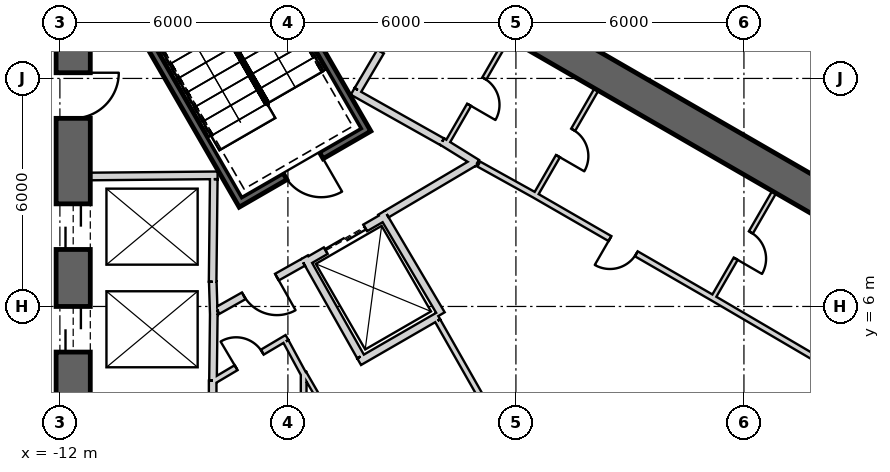
"""IFC4 building model, lengths in metres.
Left out: names, types, materials, properties, quantities, classifications, styles, units other than length and angle.
Written with IfcOpenShell. Run it as: python <this file> out.ifc"""

import sys

from ifc_helpers import new_model, si_unit, direction, frame, frame_2d, origin, place, context, subcontext, project, spatial, rectangle, extrude, element, fill, save


model = new_model("IFC4")
c1 = context("Model", 3, precision=1e-05, world=origin(), true_north=direction((0.0, 1.0)))
c2 = subcontext(c1, "Body", "Model", "MODEL_VIEW")
j1 = project(units=[si_unit("LENGTHUNIT", "METRE"), si_unit("PLANEANGLEUNIT", "RADIAN")], contexts=[c1])
p1 = place(None, origin())
s1 = spatial("IfcSite", under=j1, at=p1, CompositionType="ELEMENT")
p2 = place(p1, origin())
s2 = spatial("IfcBuilding", under=s1, at=p2, CompositionType="ELEMENT")
p3 = place(p2, frame((0.0, 0.0, 392.3)))
s3 = spatial("IfcBuildingStorey", under=s2, at=p3, CompositionType="ELEMENT", Elevation=392.3)
p4 = place(p3, frame((19.475, 2.208, 0.0), z_axis=(0.0, 0.0, 1.0), x_axis=(-0.866028369851, 0.499994862586, 0.0)))
e1 = element("IfcWall", 1, at=p4, inside=s3, PredefinedType="SHEAR", context=c2, shape_type="SweptSolid", body=[
    extrude(rectangle(XDim=31.523, YDim=0.9, at=frame_2d((15.762, 0.0))), origin(), (0.0, 0.0, 1.0), 6.0),
])
p5 = place(p4, frame((7.062, 0.0, 0.0)))
e2 = element("IfcOpeningElement", 2, at=p5, cuts=e1, PredefinedType="OPENING", context=c2, shape_type="SweptSolid", body=[
    extrude(rectangle(XDim=1.2, YDim=2.4, at=frame_2d((0.6, 1.2))), frame((0.0, 0.46, 0.0), z_axis=(0.0, -1.0, 0.0), x_axis=(1.0, 0.0, 0.0)), (0.0, 0.0, 1.0), 0.92),
])
p6 = place(p4, frame((3.612, 0.0, 0.0)))
e3 = element("IfcOpeningElement", 3, at=p6, cuts=e1, PredefinedType="OPENING", context=c2, shape_type="SweptSolid", body=[
    extrude(rectangle(XDim=1.2, YDim=2.4, at=frame_2d((0.6, 1.2))), frame((0.0, 0.46, 0.0), z_axis=(0.0, -1.0, 0.0), x_axis=(1.0, 0.0, 0.0)), (0.0, 0.0, 1.0), 0.92),
])
p7 = place(p4, frame((26.712, 0.0, 0.0)))
e4 = element("IfcOpeningElement", 4, at=p7, cuts=e1, PredefinedType="OPENING", context=c2, shape_type="SweptSolid", body=[
    extrude(rectangle(XDim=1.2, YDim=2.4, at=frame_2d((0.6, 1.2))), frame((0.0, 0.46, 0.0), z_axis=(0.0, -1.0, 0.0), x_axis=(1.0, 0.0, 0.0)), (0.0, 0.0, 1.0), 0.92),
])
p8 = place(p3, frame((-11.65, 15.762, 0.0), z_axis=(0.0, 0.0, 1.0), x_axis=(0.0, -1.0, 0.0)))
e5 = element("IfcWall", 5, at=p8, inside=s3, PredefinedType="SHEAR", context=c2, shape_type="SweptSolid", body=[
    extrude(rectangle(XDim=31.523, YDim=0.9, at=frame_2d((15.762, 0.0))), origin(), (0.0, 0.0, 1.0), 6.0),
])
p9 = place(p8, frame((7.062, 0.0, 0.0)))
e6 = element("IfcOpeningElement", 6, at=p9, cuts=e5, PredefinedType="OPENING", context=c2, shape_type="SweptSolid", body=[
    extrude(rectangle(XDim=1.2, YDim=2.4, at=frame_2d((0.6, 1.2))), frame((0.0, 0.46, 0.0), z_axis=(0.0, -1.0, 0.0), x_axis=(1.0, 0.0, 0.0)), (0.0, 0.0, 1.0), 0.92),
])
p10 = place(p8, frame((9.762, 0.0, 0.0)))
e7 = element("IfcOpeningElement", 7, at=p10, cuts=e5, PredefinedType="OPENING", context=c2, shape_type="SweptSolid", body=[
    extrude(rectangle(XDim=1.2, YDim=2.4, at=frame_2d((0.6, 1.2))), frame((0.0, 0.46, 0.0), z_axis=(0.0, -1.0, 0.0), x_axis=(1.0, 0.0, 0.0)), (0.0, 0.0, 1.0), 0.92),
])
p11 = place(p8, frame((12.462, 0.0, 0.0)))
e8 = element("IfcOpeningElement", 8, at=p11, cuts=e5, PredefinedType="OPENING", context=c2, shape_type="SweptSolid", body=[
    extrude(rectangle(XDim=1.2, YDim=2.4, at=frame_2d((0.6, 1.2))), frame((0.0, 0.46, 0.0), z_axis=(0.0, -1.0, 0.0), x_axis=(1.0, 0.0, 0.0)), (0.0, 0.0, 1.0), 0.92),
])
p12 = place(p8, frame((15.162, 0.0, 0.0)))
e9 = element("IfcOpeningElement", 9, at=p12, cuts=e5, PredefinedType="OPENING", context=c2, shape_type="SweptSolid", body=[
    extrude(rectangle(XDim=1.2, YDim=2.4, at=frame_2d((0.6, 1.2))), frame((0.0, 0.46, 0.0), z_axis=(0.0, -1.0, 0.0), x_axis=(1.0, 0.0, 0.0)), (0.0, 0.0, 1.0), 0.92),
])
p13 = place(p8, frame((17.862, 0.0, 0.0)))
e10 = element("IfcOpeningElement", 10, at=p13, cuts=e5, PredefinedType="OPENING", context=c2, shape_type="SweptSolid", body=[
    extrude(rectangle(XDim=1.2, YDim=2.4, at=frame_2d((0.6, 1.2))), frame((0.0, 0.46, 0.0), z_axis=(0.0, -1.0, 0.0), x_axis=(1.0, 0.0, 0.0)), (0.0, 0.0, 1.0), 0.92),
])
p14 = place(p8, frame((20.562, 0.0, 0.0)))
e11 = element("IfcOpeningElement", 11, at=p14, cuts=e5, PredefinedType="OPENING", context=c2, shape_type="SweptSolid", body=[
    extrude(rectangle(XDim=1.2, YDim=2.4, at=frame_2d((0.6, 1.2))), frame((0.0, 0.46, 0.0), z_axis=(0.0, -1.0, 0.0), x_axis=(1.0, 0.0, 0.0)), (0.0, 0.0, 1.0), 0.92),
])
p15 = place(p8, frame((23.262, 0.0, 0.0)))
e12 = element("IfcOpeningElement", 12, at=p15, cuts=e5, PredefinedType="OPENING", context=c2, shape_type="SweptSolid", body=[
    extrude(rectangle(XDim=1.2, YDim=2.4, at=frame_2d((0.6, 1.2))), frame((0.0, 0.46, 0.0), z_axis=(0.0, -1.0, 0.0), x_axis=(1.0, 0.0, 0.0)), (0.0, 0.0, 1.0), 0.92),
])
p16 = place(p8, frame((3.612, 0.0, 0.0)))
e13 = element("IfcOpeningElement", 13, at=p16, cuts=e5, PredefinedType="OPENING", context=c2, shape_type="SweptSolid", body=[
    extrude(rectangle(XDim=1.2, YDim=2.4, at=frame_2d((0.6, 1.2))), frame((0.0, 0.46, 0.0), z_axis=(0.0, -1.0, 0.0), x_axis=(1.0, 0.0, 0.0)), (0.0, 0.0, 1.0), 0.92),
])
p17 = place(p8, frame((26.712, 0.0, 0.0)))
e14 = element("IfcOpeningElement", 14, at=p17, cuts=e5, PredefinedType="OPENING", context=c2, shape_type="SweptSolid", body=[
    extrude(rectangle(XDim=1.2, YDim=2.4, at=frame_2d((0.6, 1.2))), frame((0.0, 0.46, 0.0), z_axis=(0.0, -1.0, 0.0), x_axis=(1.0, 0.0, 0.0)), (0.0, 0.0, 1.0), 0.92),
])
p18 = place(p3, frame((-11.2, 9.42, 0.0), z_axis=(0.0, 0.0, 1.0), x_axis=(0.999957167047, 0.009255488683, 0.0)))
e15 = element("IfcWall", 15, at=p18, inside=s3, PredefinedType="PLUMBINGWALL", context=c2, shape_type="SweptSolid", body=[
    extrude(rectangle(XDim=3.35, YDim=0.2, at=frame_2d((1.675, 0.0))), origin(), (0.0, 0.0, 1.0), 5.7),
])
p19 = place(p3, frame((-7.951, 9.35, 0.0), z_axis=(0.0, 0.0, 1.0), x_axis=(-0.011120469654, -0.999938165666, 0.0)))
e16 = element("IfcWall", 16, at=p19, inside=s3, PredefinedType="PLUMBINGWALL", context=c2, shape_type="SweptSolid", body=[
    extrude(rectangle(XDim=2.7, YDim=0.2, at=frame_2d((1.35, 0.0))), origin(), (0.0, 0.0, 1.0), 5.7),
])
p20 = place(p3, frame((-7.977, 6.65, 0.0), z_axis=(0.0, 0.0, 1.0), x_axis=(0.030861509705, -0.999523670164, 0.0)))
e17 = element("IfcWall", 17, at=p20, inside=s3, PredefinedType="PLUMBINGWALL", context=c2, shape_type="SweptSolid", body=[
    extrude(rectangle(XDim=0.878, YDim=0.2, at=frame_2d((0.439, 0.0))), origin(), (0.0, 0.0, 1.0), 5.7),
])
p21 = place(p3, frame((-7.949, 5.895, 0.0), z_axis=(0.0, 0.0, 1.0), x_axis=(-0.012042535896, -0.999927486035, 0.0)))
e18 = element("IfcWall", 18, at=p21, inside=s3, PredefinedType="PLUMBINGWALL", context=c2, shape_type="SweptSolid", body=[
    extrude(rectangle(XDim=1.845, YDim=0.2, at=frame_2d((0.922, 0.0))), origin(), (0.0, 0.0, 1.0), 5.7),
])
p22 = place(p3, frame((-7.98, 4.05, 0.0), z_axis=(0.0, 0.0, 1.0), x_axis=(0.0, -1.0, 0.0)))
e19 = element("IfcWall", 19, at=p22, inside=s3, PredefinedType="PLUMBINGWALL", context=c2, shape_type="SweptSolid", body=[
    extrude(rectangle(XDim=8.1, YDim=0.2, at=frame_2d((4.05, 0.0))), origin(), (0.0, 0.0, 1.0), 5.7),
])
p23 = place(p3, frame((-11.245, 15.678, -0.35), z_axis=(0.0, 0.0, 1.0), x_axis=(0.499977274689, -0.866038523851, 0.0)))
e20 = element("IfcWall", 20, at=p23, inside=s3, PredefinedType="SHEAR", context=c2, shape_type="SweptSolid", body=[
    extrude(rectangle(XDim=8.1, YDim=0.2, at=frame_2d((4.05, 0.0))), origin(), (0.0, 0.0, 1.0), 6.05),
])
p24 = place(p3, frame((-7.854, 17.405, -0.35), z_axis=(0.0, 0.0, 1.0), x_axis=(0.499997992926, -0.866026562566, 0.0)))
e21 = element("IfcWall", 21, at=p24, inside=s3, PredefinedType="SHEAR", context=c2, shape_type="SweptSolid", body=[
    extrude(rectangle(XDim=7.9, YDim=0.2, at=frame_2d((3.95, 0.0))), origin(), (0.0, 0.0, 1.0), 6.05),
])
p25 = place(p3, frame((-7.159, 8.8, -0.35), z_axis=(0.0, 0.0, 1.0), x_axis=(0.866047807691, 0.499961193289, 0.0)))
e22 = element("IfcWall", 22, at=p25, inside=s3, PredefinedType="SHEAR", context=c2, shape_type="SweptSolid", body=[
    extrude(rectangle(XDim=3.6, YDim=0.2, at=frame_2d((1.8, 0.0))), origin(), (0.0, 0.0, 1.0), 6.05),
])
p26 = place(p25, frame((1.25, 0.0, 0.35)))
e23 = element("IfcOpeningElement", 23, at=p26, cuts=e22, PredefinedType="OPENING", context=c2, shape_type="SweptSolid", body=[
    extrude(rectangle(XDim=1.1, YDim=2.1, at=frame_2d((0.55, 1.05))), frame((0.0, 0.11, 0.0), z_axis=(0.0, -1.0, 0.0), x_axis=(1.0, 0.0, 0.0)), (0.0, 0.0, 1.0), 0.22),
])
p27 = place(p3, frame((-5.524, 7.168, 0.0), z_axis=(0.0, 0.0, 1.0), x_axis=(0.866024647952, 0.500001309137, 0.0)))
e24 = element("IfcWall", 24, at=p27, inside=s3, PredefinedType="PLUMBINGWALL", context=c2, shape_type="SweptSolid", body=[
    extrude(rectangle(XDim=2.4, YDim=0.2, at=frame_2d((1.2, 0.0))), origin(), (0.0, 0.0, 1.0), 5.7),
])
p28 = place(p27, frame((0.6, 0.0, 0.0)))
e25 = element("IfcOpeningElement", 25, at=p28, cuts=e24, PredefinedType="OPENING", context=c2, shape_type="SweptSolid", body=[
    extrude(rectangle(XDim=1.2, YDim=2.4, at=frame_2d((0.6, 1.2))), frame((0.0, 0.11, 0.0), z_axis=(0.0, -1.0, 0.0), x_axis=(1.0, 0.0, 0.0)), (0.0, 0.0, 1.0), 0.22),
])
p29 = place(p3, frame((-3.538, 8.465, 0.0), z_axis=(0.0, 0.0, 1.0), x_axis=(0.508647062354, -0.860975125052, 0.0)))
e26 = element("IfcWall", 26, at=p29, inside=s3, PredefinedType="PLUMBINGWALL", context=c2, shape_type="SweptSolid", body=[
    extrude(rectangle(XDim=3.1, YDim=0.2, at=frame_2d((1.55, 0.0))), origin(), (0.0, 0.0, 1.0), 5.7),
])
p30 = place(p3, frame((-2.043, 5.748, 0.0), z_axis=(0.0, 0.0, 1.0), x_axis=(-0.866035096217, -0.499983211839, 0.0)))
e27 = element("IfcWall", 27, at=p30, inside=s3, PredefinedType="PLUMBINGWALL", context=c2, shape_type="SweptSolid", body=[
    extrude(rectangle(XDim=2.404, YDim=0.2, at=frame_2d((1.202, 0.0))), origin(), (0.0, 0.0, 1.0), 5.7),
])
p31 = place(p3, frame((-5.562, 7.296, 0.0), z_axis=(0.0, 0.0, 1.0), x_axis=(0.49134651263, -0.870964180966, 0.0)))
e28 = element("IfcWall", 28, at=p31, inside=s3, PredefinedType="PLUMBINGWALL", context=c2, shape_type="SweptSolid", body=[
    extrude(rectangle(XDim=3.0, YDim=0.2, at=frame_2d((1.5, 0.0))), origin(), (0.0, 0.0, 1.0), 5.7),
])
p32 = place(p3, frame((6.795, 9.01, 0.0), z_axis=(0.0, 0.0, 1.0), x_axis=(-0.499984717929, -0.866034226713, 0.0)))
e29 = element("IfcWall", 29, at=p32, inside=s3, PredefinedType="PARTITIONING", context=c2, shape_type="SweptSolid", body=[
    extrude(rectangle(XDim=3.25, YDim=0.12, at=frame_2d((1.625, 0.0))), origin(), (0.0, 0.0, 1.0), 5.7),
])
p33 = place(p32, frame((1.225, 0.0, 0.0)))
e30 = element("IfcOpeningElement", 30, at=p33, cuts=e29, PredefinedType="OPENING", context=c2, shape_type="SweptSolid", body=[
    extrude(rectangle(XDim=0.8, YDim=2.1, at=frame_2d((0.4, 1.05))), frame((0.0, 0.07, 0.0), z_axis=(0.0, -1.0, 0.0), x_axis=(1.0, 0.0, 0.0)), (0.0, 0.0, 1.0), 0.14),
])
p34 = place(p3, frame((8.931, 4.025, 0.0), z_axis=(0.0, 0.0, 1.0), x_axis=(-0.862666884027, 0.505772525157, 0.0)))
e31 = element("IfcWall", 31, at=p34, inside=s3, PredefinedType="PLUMBINGWALL", context=c2, shape_type="SweptSolid", body=[
    extrude(rectangle(XDim=4.372, YDim=0.15, at=frame_2d((2.186, 0.0))), origin(), (0.0, 0.0, 1.0), 5.7),
])
p35 = place(p3, frame((2.119, 11.709, 0.0), z_axis=(0.0, 0.0, 1.0), x_axis=(-0.500017246033, -0.866015446554, 0.0)))
e32 = element("IfcWall", 32, at=p35, inside=s3, PredefinedType="PARTITIONING", context=c2, shape_type="SweptSolid", body=[
    extrude(rectangle(XDim=3.25, YDim=0.12, at=frame_2d((1.625, 0.0))), origin(), (0.0, 0.0, 1.0), 5.7),
])
p36 = place(p35, frame((1.225, 0.0, 0.0)))
e33 = element("IfcOpeningElement", 33, at=p36, cuts=e32, PredefinedType="OPENING", context=c2, shape_type="SweptSolid", body=[
    extrude(rectangle(XDim=0.8, YDim=2.1, at=frame_2d((0.4, 1.05))), frame((0.0, 0.07, 0.0), z_axis=(0.0, -1.0, 0.0), x_axis=(1.0, 0.0, 0.0)), (0.0, 0.0, 1.0), 0.14),
])
p37 = place(p3, frame((5.159, 6.236, 0.0), z_axis=(0.0, 0.0, 1.0), x_axis=(-0.866028230842, 0.499995103361, 0.0)))
e34 = element("IfcWall", 34, at=p37, inside=s3, PredefinedType="PLUMBINGWALL", context=c2, shape_type="SweptSolid", body=[
    extrude(rectangle(XDim=5.4, YDim=0.15, at=frame_2d((2.7, 0.0))), origin(), (0.0, 0.0, 1.0), 5.7),
])
p38 = place(p37, frame((2.3, 0.0, 0.0)))
e35 = element("IfcOpeningElement", 35, at=p38, cuts=e34, PredefinedType="OPENING", context=c2, shape_type="SweptSolid", body=[
    extrude(rectangle(XDim=0.8, YDim=2.1, at=frame_2d((0.4, 1.05))), frame((0.0, 0.085, 0.0), z_axis=(0.0, -1.0, 0.0), x_axis=(1.0, 0.0, 0.0)), (0.0, 0.0, 1.0), 0.17),
])
p39 = place(p3, frame((-0.22, 13.06, 0.0), z_axis=(0.0, 0.0, 1.0), x_axis=(-0.499984717929, -0.866034226713, 0.0)))
e36 = element("IfcWall", 36, at=p39, inside=s3, PredefinedType="PARTITIONING", context=c2, shape_type="SweptSolid", body=[
    extrude(rectangle(XDim=3.25, YDim=0.12, at=frame_2d((1.625, 0.0))), origin(), (0.0, 0.0, 1.0), 5.7),
])
p40 = place(p39, frame((1.225, 0.0, 0.0)))
e37 = element("IfcOpeningElement", 37, at=p40, cuts=e36, PredefinedType="OPENING", context=c2, shape_type="SweptSolid", body=[
    extrude(rectangle(XDim=0.8, YDim=2.1, at=frame_2d((0.4, 1.05))), frame((0.0, 0.07, 0.0), z_axis=(0.0, -1.0, 0.0), x_axis=(1.0, 0.0, 0.0)), (0.0, 0.0, 1.0), 0.14),
])
p41 = place(p3, frame((-1.941, 10.339, 0.0), z_axis=(0.0, 0.0, 1.0), x_axis=(0.850216889117, -0.526432561171, 0.0)))
e38 = element("IfcWall", 38, at=p41, inside=s3, PredefinedType="PARTITIONING", context=c2, shape_type="SweptSolid", body=[
    extrude(rectangle(XDim=1.078, YDim=0.2, at=frame_2d((0.539, 0.0))), origin(), (0.0, 0.0, 1.0), 5.7),
])
p42 = place(p3, frame((0.483, 8.936, 0.0), z_axis=(0.0, 0.0, 1.0), x_axis=(-0.874315691004, 0.485357674776, 0.0)))
e39 = element("IfcWall", 39, at=p42, inside=s3, PredefinedType="PLUMBINGWALL", context=c2, shape_type="SweptSolid", body=[
    extrude(rectangle(XDim=1.671, YDim=0.15, at=frame_2d((0.836, 0.0))), origin(), (0.0, 0.0, 1.0), 5.7),
])
p43 = place(p3, frame((-4.296, 11.659, 0.0), z_axis=(0.0, 0.0, 1.0), x_axis=(0.871534483978, -0.490334215854, 0.0)))
e40 = element("IfcWall", 40, at=p43, inside=s3, PredefinedType="PARTITIONING", context=c2, shape_type="SweptSolid", body=[
    extrude(rectangle(XDim=2.7, YDim=0.2, at=frame_2d((1.35, 0.0))), origin(), (0.0, 0.0, 1.0), 5.7),
])
p44 = place(p3, frame((-2.558, 14.409, 0.0), z_axis=(0.0, 0.0, 1.0), x_axis=(-0.508018930956, -0.861345903683, 0.0)))
e41 = element("IfcWall", 41, at=p44, inside=s3, PredefinedType="PARTITIONING", context=c2, shape_type="SweptSolid", body=[
    extrude(rectangle(XDim=3.15, YDim=0.2, at=frame_2d((1.575, 0.0))), origin(), (0.0, 0.0, 1.0), 5.7),
])
p45 = place(p44, frame((1.175, 0.0, 0.0)))
e42 = element("IfcOpeningElement", 42, at=p45, cuts=e41, PredefinedType="OPENING", context=c2, shape_type="SweptSolid", body=[
    extrude(rectangle(XDim=0.8, YDim=2.1, at=frame_2d((0.4, 1.05))), frame((0.0, 0.11, 0.0), z_axis=(0.0, -1.0, 0.0), x_axis=(1.0, 0.0, 0.0)), (0.0, 0.0, 1.0), 0.22),
])
p46 = place(p3, frame((-1.056, 9.818, 0.0), z_axis=(0.0, 0.0, 1.0), x_axis=(-0.860599924646, -0.509281621207, 0.0)))
e43 = element("IfcWall", 43, at=p46, inside=s3, PredefinedType="PARTITIONING", context=c2, shape_type="SweptSolid", body=[
    extrude(rectangle(XDim=2.725, YDim=0.2, at=frame_2d((1.362, 0.0))), origin(), (0.0, 0.0, 1.0), 5.7),
])
p47 = place(p3, frame((-5.6, 7.16, 0.0), z_axis=(0.0, 0.0, 1.0), x_axis=(-0.871363259478, -0.490638431059, 0.0)))
e44 = element("IfcWall", 44, at=p47, inside=s3, PredefinedType="PARTITIONING", context=c2, shape_type="SweptSolid", body=[
    extrude(rectangle(XDim=2.581, YDim=0.2, at=frame_2d((1.291, 0.0))), origin(), (0.0, 0.0, 1.0), 5.7),
])
p48 = place(p47, frame((0.791, 0.0, 0.0)))
e45 = element("IfcOpeningElement", 45, at=p48, cuts=e44, PredefinedType="OPENING", context=c2, shape_type="SweptSolid", body=[
    extrude(rectangle(XDim=1.0, YDim=2.1, at=frame_2d((0.5, 1.05))), frame((0.0, 0.11, 0.0), z_axis=(0.0, -1.0, 0.0), x_axis=(1.0, 0.0, 0.0)), (0.0, 0.0, 1.0), 0.22),
])
p49 = place(p3, frame((-2.059, 5.624, 0.0), z_axis=(0.0, 0.0, 1.0), x_axis=(0.494149180773, -0.869377125959, 0.0)))
e46 = element("IfcWall", 46, at=p49, inside=s3, PredefinedType="PLUMBINGWALL", context=c2, shape_type="SweptSolid", body=[
    extrude(rectangle(XDim=4.231, YDim=0.15, at=frame_2d((2.116, 0.0))), origin(), (0.0, 0.0, 1.0), 5.7),
])
p50 = place(p3, frame((-5.586, -4.275, 0.0), z_axis=(0.0, 0.0, 1.0), x_axis=(0.0, 1.0, 0.0)))
e47 = element("IfcWall", 47, at=p50, inside=s3, PredefinedType="PLUMBINGWALL", context=c2, shape_type="SweptSolid", body=[
    extrude(rectangle(XDim=8.549, YDim=0.15, at=frame_2d((4.275, 0.0))), origin(), (0.0, 0.0, 1.0), 5.7),
])
p51 = place(p3, frame((-6.024, 5.183, 0.0), z_axis=(0.0, 0.0, 1.0), x_axis=(-0.860126804455, -0.510080268447, 0.0)))
e48 = element("IfcWall", 48, at=p51, inside=s3, PredefinedType="PLUMBINGWALL", context=c2, shape_type="SweptSolid", body=[
    extrude(rectangle(XDim=2.24, YDim=0.15, at=frame_2d((1.12, 0.0))), origin(), (0.0, 0.0, 1.0), 5.7),
])
p52 = place(p51, frame((0.757, 0.0, 0.0)))
e49 = element("IfcOpeningElement", 49, at=p52, cuts=e48, PredefinedType="OPENING", context=c2, shape_type="SweptSolid", body=[
    extrude(rectangle(XDim=0.8, YDim=2.1, at=frame_2d((0.4, 1.05))), frame((0.0, 0.085, 0.0), z_axis=(0.0, -1.0, 0.0), x_axis=(1.0, 0.0, 0.0)), (0.0, 0.0, 1.0), 0.17),
])
p53 = place(p3, frame((-5.571, 4.19, 0.0), z_axis=(0.0, 0.0, 1.0), x_axis=(-0.476127658675, 0.879376172434, 0.0)))
e50 = element("IfcWall", 50, at=p53, inside=s3, PredefinedType="PLUMBINGWALL", context=c2, shape_type="SweptSolid", body=[
    extrude(rectangle(XDim=1.012, YDim=0.15, at=frame_2d((0.506, 0.0))), origin(), (0.0, 0.0, 1.0), 5.7),
])
p54 = place(p3, frame((-4.558, 2.495, 0.0), z_axis=(0.0, 0.0, 1.0), x_axis=(-0.499990325971, 0.866030989016, 0.0)))
e51 = element("IfcWall", 51, at=p54, inside=s3, PredefinedType="PARTITIONING", context=c2, shape_type="SweptSolid", body=[
    extrude(rectangle(XDim=2.025, YDim=0.12, at=frame_2d((1.012, 0.0))), origin(), (0.0, 0.0, 1.0), 5.7),
])
p55 = place(p3, frame((22.792, 6.009, 0.0), z_axis=(0.0, 0.0, 1.0), x_axis=(-0.866028288731, 0.499995003092, 0.0)))
e52 = element("IfcWall", 52, at=p55, inside=s3, PredefinedType="PARTITIONING", context=c2, shape_type="SweptSolid", body=[
    extrude(rectangle(XDim=23.262, YDim=0.2, at=frame_2d((11.631, 0.0))), origin(), (0.0, 0.0, 1.0), 5.07),
])
p56 = place(p55, frame((11.1, 0.0, 0.0)))
e53 = element("IfcOpeningElement", 53, at=p56, cuts=e52, PredefinedType="OPENING", context=c2, shape_type="SweptSolid", body=[
    extrude(rectangle(XDim=1.0, YDim=2.1, at=frame_2d((0.5, 1.05))), frame((0.0, 0.11, 0.0), z_axis=(0.0, -1.0, 0.0), x_axis=(1.0, 0.0, 0.0)), (0.0, 0.0, 1.0), 0.22),
])
p57 = place(p26, origin())
e54 = element("IfcDoor", 54, at=p57, inside=s3, OperationType="SINGLE_SWING_RIGHT", PredefinedType="USERDEFINED", context=c2, shape_type="SweptSolid", body=[
    extrude(rectangle(XDim=1.1, YDim=2.1, at=frame_2d((0.55, 1.05))), frame((0.0, 0.025, 0.0), z_axis=(0.0, -1.0, 0.0), x_axis=(1.0, 0.0, 0.0)), (0.0, 0.0, 1.0), 0.05),
])
fill(e23, e54)
p58 = place(p48, origin())
e55 = element("IfcDoor", 55, at=p58, inside=s3, OperationType="SINGLE_SWING_LEFT", PredefinedType="USERDEFINED", context=c2, shape_type="SweptSolid", body=[
    extrude(rectangle(XDim=1.0, YDim=2.1, at=frame_2d((0.5, 1.05))), frame((0.0, 0.025, 0.0), z_axis=(0.0, -1.0, 0.0), x_axis=(1.0, 0.0, 0.0)), (0.0, 0.0, 1.0), 0.05),
])
fill(e45, e55)
p59 = place(p28, origin())
e56 = element("IfcDoor", 56, at=p59, inside=s3, OperationType="SLIDING_TO_LEFT", PredefinedType="USERDEFINED", context=c2, shape_type="SweptSolid", body=[
    extrude(rectangle(XDim=1.2, YDim=2.4, at=frame_2d((0.6, 1.2))), frame((0.0, 0.025, 0.0), z_axis=(0.0, -1.0, 0.0), x_axis=(1.0, 0.0, 0.0)), (0.0, 0.0, 1.0), 0.05),
])
fill(e25, e56)
p60 = place(p52, origin())
e57 = element("IfcDoor", 57, at=p60, inside=s3, OperationType="SINGLE_SWING_RIGHT", PredefinedType="USERDEFINED", context=c2, shape_type="SweptSolid", body=[
    extrude(rectangle(XDim=0.8, YDim=2.1, at=frame_2d((0.4, 1.05))), frame((0.0, 0.025, 0.0), z_axis=(0.0, -1.0, 0.0), x_axis=(1.0, 0.0, 0.0)), (0.0, 0.0, 1.0), 0.05),
])
fill(e49, e57)
p61 = place(p33, origin())
e58 = element("IfcDoor", 58, at=p61, inside=s3, OperationType="SINGLE_SWING_RIGHT", PredefinedType="USERDEFINED", context=c2, shape_type="SweptSolid", body=[
    extrude(rectangle(XDim=0.8, YDim=2.1, at=frame_2d((0.4, 1.05))), frame((0.0, 0.025, 0.0), z_axis=(0.0, -1.0, 0.0), x_axis=(1.0, 0.0, 0.0)), (0.0, 0.0, 1.0), 0.05),
])
fill(e30, e58)
p62 = place(p36, origin())
e59 = element("IfcDoor", 59, at=p62, inside=s3, OperationType="SINGLE_SWING_RIGHT", PredefinedType="USERDEFINED", context=c2, shape_type="SweptSolid", body=[
    extrude(rectangle(XDim=0.8, YDim=2.1, at=frame_2d((0.4, 1.05))), frame((0.0, 0.025, 0.0), z_axis=(0.0, -1.0, 0.0), x_axis=(1.0, 0.0, 0.0)), (0.0, 0.0, 1.0), 0.05),
])
fill(e33, e59)
p63 = place(p38, origin())
e60 = element("IfcDoor", 60, at=p63, inside=s3, OperationType="SINGLE_SWING_RIGHT", PredefinedType="USERDEFINED", context=c2, shape_type="SweptSolid", body=[
    extrude(rectangle(XDim=0.8, YDim=2.1, at=frame_2d((0.4, 1.05))), frame((0.0, 0.025, 0.0), z_axis=(0.0, -1.0, 0.0), x_axis=(1.0, 0.0, 0.0)), (0.0, 0.0, 1.0), 0.05),
])
fill(e35, e60)
p64 = place(p40, origin())
e61 = element("IfcDoor", 61, at=p64, inside=s3, OperationType="SINGLE_SWING_RIGHT", PredefinedType="USERDEFINED", context=c2, shape_type="SweptSolid", body=[
    extrude(rectangle(XDim=0.8, YDim=2.1, at=frame_2d((0.4, 1.05))), frame((0.0, 0.025, 0.0), z_axis=(0.0, -1.0, 0.0), x_axis=(1.0, 0.0, 0.0)), (0.0, 0.0, 1.0), 0.05),
])
fill(e37, e61)
p65 = place(p9, origin())
e62 = element("IfcDoor", 62, at=p65, inside=s3, OperationType="SLIDING_TO_LEFT", PredefinedType="USERDEFINED", context=c2, shape_type="SweptSolid", body=[
    extrude(rectangle(XDim=1.2, YDim=2.4, at=frame_2d((0.6, 1.2))), frame((0.0, 0.025, 0.0), z_axis=(0.0, -1.0, 0.0), x_axis=(1.0, 0.0, 0.0)), (0.0, 0.0, 1.0), 0.05),
])
fill(e6, e62)
p66 = place(p10, origin())
e63 = element("IfcDoor", 63, at=p66, inside=s3, OperationType="SLIDING_TO_LEFT", PredefinedType="USERDEFINED", context=c2, shape_type="SweptSolid", body=[
    extrude(rectangle(XDim=1.2, YDim=2.4, at=frame_2d((0.6, 1.2))), frame((0.0, 0.025, 0.0), z_axis=(0.0, -1.0, 0.0), x_axis=(1.0, 0.0, 0.0)), (0.0, 0.0, 1.0), 0.05),
])
fill(e7, e63)
p67 = place(p16, origin())
e64 = element("IfcDoor", 64, at=p67, inside=s3, OperationType="SINGLE_SWING_LEFT", PredefinedType="USERDEFINED", context=c2, shape_type="SweptSolid", body=[
    extrude(rectangle(XDim=1.2, YDim=2.4, at=frame_2d((0.6, 1.2))), frame((0.0, 0.025, 0.0), z_axis=(0.0, -1.0, 0.0), x_axis=(1.0, 0.0, 0.0)), (0.0, 0.0, 1.0), 0.05),
])
fill(e13, e64)
save(model, sys.argv[1])
